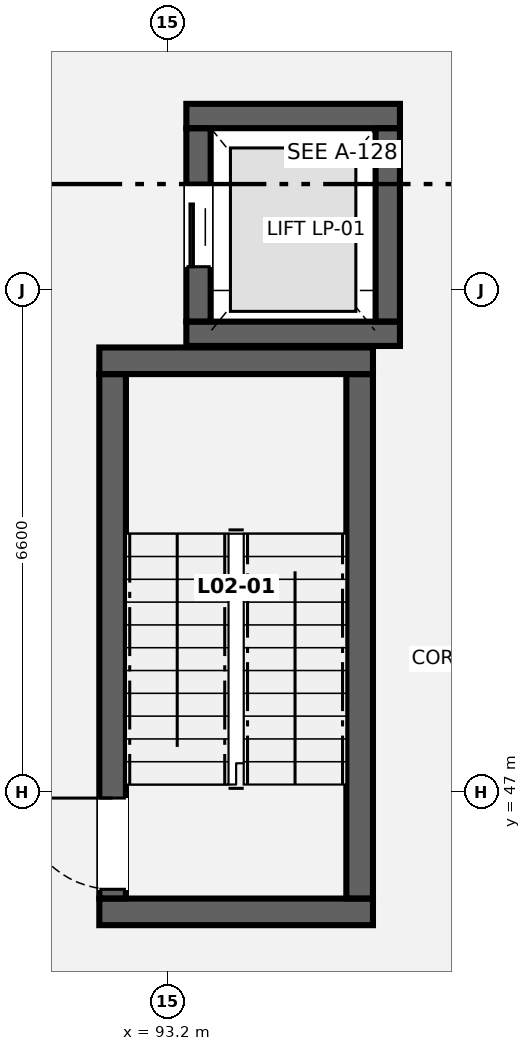
"""IFC4 building model, lengths in metres.
Left out: names, types, materials, properties, quantities, classifications, styles, units other than length and angle.
Written with IfcOpenShell. Run it as: python <this file> out.ifc"""

import sys

from ifc_helpers import new_model, si_unit, direction, frame, frame_2d, origin, place, context, subcontext, project, spatial, rectangle, extrude, element, fill, save


model = new_model("IFC4")
c1 = context("Model", 3, precision=1e-05, world=origin(), true_north=direction((0.0, 1.0)))
c2 = subcontext(c1, "Body", "Model", "MODEL_VIEW")
j1 = project(units=[si_unit("LENGTHUNIT", "METRE"), si_unit("PLANEANGLEUNIT", "RADIAN")], contexts=[c1])
p1 = place(None, origin())
s1 = spatial("IfcSite", under=j1, at=p1, CompositionType="ELEMENT")
p2 = place(p1, origin())
s2 = spatial("IfcBuilding", under=s1, at=p2, CompositionType="ELEMENT")
p3 = place(p2, frame((0.0, 0.0, 9.1)))
s3 = spatial("IfcBuildingStorey", under=s2, at=p3, CompositionType="ELEMENT", Elevation=9.1)
for number, where, z_axis, x_axis in (
    (1, (92.3, 45.425, 0.0), (0.0, 0.0, 1.0), (1.0, 0.0, 0.0)),
    (2, (92.3, 52.675, 0.0), (0.0, 0.0, 1.0), (1.0, 0.0, 0.0)),
):
    element("IfcWall", number, at=place(p3, frame(where, z_axis=z_axis, x_axis=x_axis)), inside=s3, PredefinedType="SHEAR", context=c2, shape_type="SweptSolid", body=[
        extrude(rectangle(XDim=3.6, YDim=0.35, at=frame_2d((1.8, 0.0))), origin(), (0.0, 0.0, 1.0), 4.0),
    ])
p4 = place(p3, frame((92.475, 45.602, 0.0), z_axis=(0.0, 0.0, 1.0), x_axis=(0.0, 1.0, 0.0)))
e3 = element("IfcWall", 3, at=p4, inside=s3, PredefinedType="SHEAR", context=c2, shape_type="SweptSolid", body=[
    extrude(rectangle(XDim=6.896, YDim=0.35, at=frame_2d((3.448, 0.0))), origin(), (0.0, 0.0, 1.0), 4.0),
])
p5 = place(p4, frame((0.12, 0.0, 0.0)))
e4 = element("IfcOpeningElement", 4, at=p5, cuts=e3, PredefinedType="OPENING", context=c2, shape_type="SweptSolid", body=[
    extrude(rectangle(XDim=1.2, YDim=2.15, at=frame_2d((0.6, 1.075))), frame((0.0, 0.185, 0.0), z_axis=(0.0, -1.0, 0.0), x_axis=(1.0, 0.0, 0.0)), (0.0, 0.0, 1.0), 0.37),
])
p6 = place(p3, frame((95.725, 45.602, 0.0), z_axis=(0.0, 0.0, 1.0), x_axis=(0.0, 1.0, 0.0)))
e5 = element("IfcWall", 5, at=p6, inside=s3, PredefinedType="SHEAR", context=c2, shape_type="SweptSolid", body=[
    extrude(rectangle(XDim=6.896, YDim=0.35, at=frame_2d((3.448, 0.0))), origin(), (0.0, 0.0, 1.0), 4.0),
])
for number, where, z_axis, x_axis in (
    (6, (93.445, 53.03, 0.0), (0.0, 0.0, 1.0), (1.0, 0.0, 0.0)),
    (7, (93.445, 55.895, 0.0), (0.0, 0.0, 1.0), (1.0, 0.0, 0.0)),
):
    element("IfcWall", number, at=place(p3, frame(where, z_axis=z_axis, x_axis=x_axis)), inside=s3, PredefinedType="SHEAR", context=c2, shape_type="SweptSolid", body=[
        extrude(rectangle(XDim=2.81, YDim=0.32, at=frame_2d((1.405, 0.0))), origin(), (0.0, 0.0, 1.0), 4.0),
    ])
p7 = place(p3, frame((93.605, 53.192, 0.0), z_axis=(0.0, 0.0, 1.0), x_axis=(0.0, 1.0, 0.0)))
e8 = element("IfcWall", 8, at=p7, inside=s3, PredefinedType="SHEAR", context=c2, shape_type="SweptSolid", body=[
    extrude(rectangle(XDim=2.541, YDim=0.32, at=frame_2d((1.271, 0.0))), origin(), (0.0, 0.0, 1.0), 4.0),
])
p8 = place(p7, frame((0.72, 0.0, 0.0)))
e9 = element("IfcOpeningElement", 9, at=p8, cuts=e8, PredefinedType="OPENING", context=c2, shape_type="SweptSolid", body=[
    extrude(rectangle(XDim=1.1, YDim=2.15, at=frame_2d((0.55, 1.075))), frame((0.0, 0.17, 0.0), z_axis=(0.0, -1.0, 0.0), x_axis=(1.0, 0.0, 0.0)), (0.0, 0.0, 1.0), 0.34),
])
p9 = place(p3, frame((96.095, 53.192, 0.0), z_axis=(0.0, 0.0, 1.0), x_axis=(0.0, 1.0, 0.0)))
e10 = element("IfcWall", 10, at=p9, inside=s3, PredefinedType="SHEAR", context=c2, shape_type="SweptSolid", body=[
    extrude(rectangle(XDim=2.541, YDim=0.32, at=frame_2d((1.271, 0.0))), origin(), (0.0, 0.0, 1.0), 4.0),
])
p10 = place(p5, origin())
e11 = element("IfcDoor", 11, at=p10, inside=s3, OperationType="SINGLE_SWING_RIGHT", PredefinedType="DOOR", context=c2, shape_type="SweptSolid", body=[
    extrude(rectangle(XDim=1.2, YDim=2.15, at=frame_2d((0.6, 1.075))), frame((0.0, 0.025, 0.0), z_axis=(0.0, -1.0, 0.0), x_axis=(1.0, 0.0, 0.0)), (0.0, 0.0, 1.0), 0.05),
])
fill(e4, e11)
p11 = place(p8, origin())
e12 = element("IfcDoor", 12, at=p11, inside=s3, OperationType="SLIDING_TO_LEFT", PredefinedType="DOOR", context=c2, shape_type="SweptSolid", body=[
    extrude(rectangle(XDim=1.1, YDim=2.15, at=frame_2d((0.55, 1.075))), frame((0.0, 0.025, 0.0), z_axis=(0.0, -1.0, 0.0), x_axis=(1.0, 0.0, 0.0)), (0.0, 0.0, 1.0), 0.05),
])
fill(e9, e12)
save(model, sys.argv[1])
